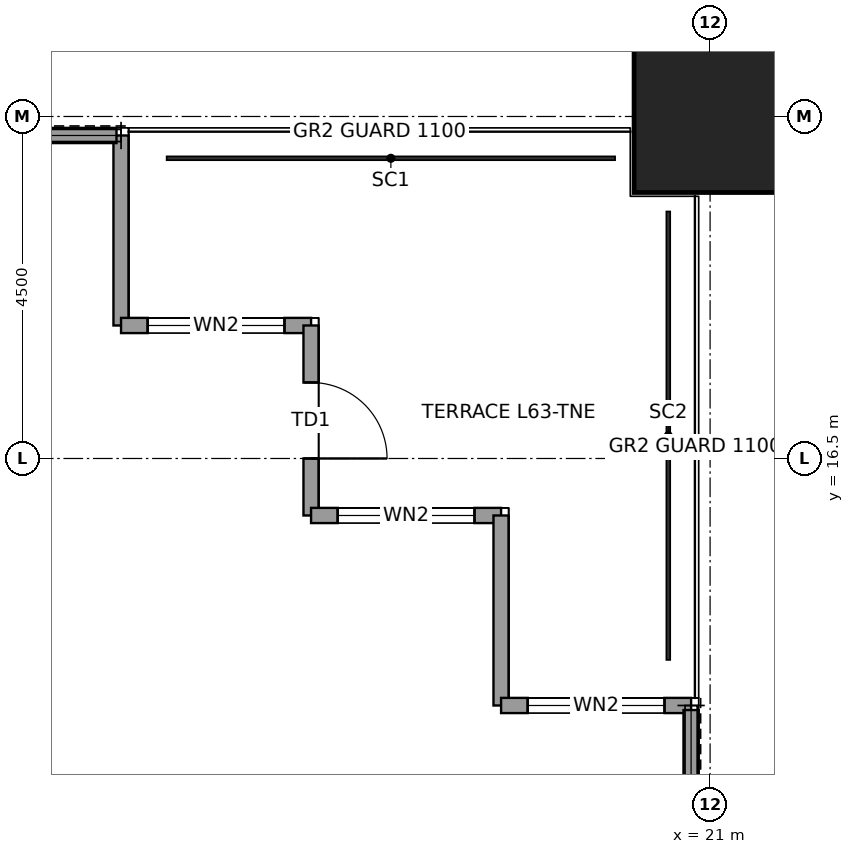
"""IFC4 building model, lengths in metres.
Left out: names, types, materials, properties, quantities, classifications, styles, units other than length and angle.
Written with IfcOpenShell. Run it as: python <this file> out.ifc"""

import sys

from ifc_helpers import new_model, si_unit, direction, frame, frame_2d, origin, origin_2d, place, context, subcontext, project, spatial, rectangle, hollow_rectangle, extrude, element, fill, save


model = new_model("IFC4")
c1 = context("Model", 3, precision=1e-05, world=origin(), true_north=direction((0.0, 1.0)))
c2 = subcontext(c1, "Body", "Model", "MODEL_VIEW")
j1 = project(units=[si_unit("LENGTHUNIT", "METRE"), si_unit("PLANEANGLEUNIT", "RADIAN")], contexts=[c1])
p1 = place(None, origin())
s1 = spatial("IfcSite", under=j1, at=p1, CompositionType="ELEMENT")
p2 = place(p1, origin())
s2 = spatial("IfcBuilding", under=s1, at=p2, CompositionType="ELEMENT")
p3 = place(p2, frame((0.0, 0.0, 287.9)))
s3 = spatial("IfcBuildingStorey", under=s2, at=p3, CompositionType="ELEMENT", Elevation=287.9)
p4 = place(p3, frame((21.0, 21.0, 0.0), z_axis=(0.0, 0.0, 1.0), x_axis=(1.0, 0.0, 0.0)))
e1 = element("IfcColumn", 1, at=p4, inside=s3, PredefinedType="COLUMN", context=c2, shape_type="SweptSolid", body=[
    extrude(hollow_rectangle(XDim=2.0, YDim=2.0, WallThickness=0.095, at=origin_2d()), origin(), (0.0, 0.0, 1.0), 4.0),
])
p5 = place(p3, frame((13.25, 20.75, 0.0), z_axis=(0.0, 0.0, 1.0), x_axis=(0.0, -1.0, 0.0)))
e2 = element("IfcWall", 2, at=p5, inside=s3, PredefinedType="SOLIDWALL", context=c2, shape_type="SweptSolid", body=[
    extrude(rectangle(XDim=2.5, YDim=0.2, at=frame_2d((1.25, 0.0))), origin(), (0.0, 0.0, 1.0), 3.85),
])
p6 = place(p3, frame((13.25, 18.25, 0.0), z_axis=(0.0, 0.0, 1.0), x_axis=(1.0, 0.0, 0.0)))
e3 = element("IfcWall", 3, at=p6, inside=s3, PredefinedType="SOLIDWALL", context=c2, shape_type="SweptSolid", body=[
    extrude(rectangle(XDim=2.5, YDim=0.2, at=frame_2d((1.25, 0.0))), origin(), (0.0, 0.0, 1.0), 3.85),
])
p7 = place(p6, frame((0.35, 0.0, 0.3)))
e4 = element("IfcOpeningElement", 4, at=p7, cuts=e3, PredefinedType="OPENING", context=c2, shape_type="SweptSolid", body=[
    extrude(rectangle(XDim=1.8, YDim=2.4, at=frame_2d((0.9, 1.2))), frame((0.0, 0.11, 0.0), z_axis=(0.0, -1.0, 0.0), x_axis=(1.0, 0.0, 0.0)), (0.0, 0.0, 1.0), 0.22),
])
p8 = place(p3, frame((15.75, 18.25, 0.0), z_axis=(0.0, 0.0, 1.0), x_axis=(0.0, -1.0, 0.0)))
e5 = element("IfcWall", 5, at=p8, inside=s3, PredefinedType="SOLIDWALL", context=c2, shape_type="SweptSolid", body=[
    extrude(rectangle(XDim=2.5, YDim=0.2, at=frame_2d((1.25, 0.0))), origin(), (0.0, 0.0, 1.0), 3.317),
])
p9 = place(p8, frame((0.75, 0.0, 0.0)))
e6 = element("IfcOpeningElement", 6, at=p9, cuts=e5, PredefinedType="OPENING", context=c2, shape_type="SweptSolid", body=[
    extrude(rectangle(XDim=1.0, YDim=2.4, at=frame_2d((0.5, 1.2))), frame((0.0, 0.11, 0.0), z_axis=(0.0, -1.0, 0.0), x_axis=(1.0, 0.0, 0.0)), (0.0, 0.0, 1.0), 0.22),
])
p10 = place(p3, frame((15.75, 15.75, 0.0), z_axis=(0.0, 0.0, 1.0), x_axis=(1.0, 0.0, 0.0)))
e7 = element("IfcWall", 7, at=p10, inside=s3, PredefinedType="SOLIDWALL", context=c2, shape_type="SweptSolid", body=[
    extrude(rectangle(XDim=2.5, YDim=0.2, at=frame_2d((1.25, 0.0))), origin(), (0.0, 0.0, 1.0), 3.85),
])
p11 = place(p10, frame((0.35, 0.0, 0.3)))
e8 = element("IfcOpeningElement", 8, at=p11, cuts=e7, PredefinedType="OPENING", context=c2, shape_type="SweptSolid", body=[
    extrude(rectangle(XDim=1.8, YDim=2.4, at=frame_2d((0.9, 1.2))), frame((0.0, 0.11, 0.0), z_axis=(0.0, -1.0, 0.0), x_axis=(1.0, 0.0, 0.0)), (0.0, 0.0, 1.0), 0.22),
])
p12 = place(p3, frame((18.25, 15.75, 0.0), z_axis=(0.0, 0.0, 1.0), x_axis=(0.0, -1.0, 0.0)))
e9 = element("IfcWall", 9, at=p12, inside=s3, PredefinedType="SOLIDWALL", context=c2, shape_type="SweptSolid", body=[
    extrude(rectangle(XDim=2.5, YDim=0.2, at=frame_2d((1.25, 0.0))), origin(), (0.0, 0.0, 1.0), 3.85),
])
p13 = place(p3, frame((18.25, 13.25, 0.0), z_axis=(0.0, 0.0, 1.0), x_axis=(1.0, 0.0, 0.0)))
e10 = element("IfcWall", 10, at=p13, inside=s3, PredefinedType="SOLIDWALL", context=c2, shape_type="SweptSolid", body=[
    extrude(rectangle(XDim=2.5, YDim=0.2, at=frame_2d((1.25, 0.0))), origin(), (0.0, 0.0, 1.0), 3.85),
])
p14 = place(p13, frame((0.35, 0.0, 0.3)))
e11 = element("IfcOpeningElement", 11, at=p14, cuts=e10, PredefinedType="OPENING", context=c2, shape_type="SweptSolid", body=[
    extrude(rectangle(XDim=1.8, YDim=2.4, at=frame_2d((0.9, 1.2))), frame((0.0, 0.11, 0.0), z_axis=(0.0, -1.0, 0.0), x_axis=(1.0, 0.0, 0.0)), (0.0, 0.0, 1.0), 0.22),
])
for number, where, z_axis, x_axis in (
    (12, (10.405, 20.75, 0.0), (0.0, 0.0, 1.0), (1.0, 0.0, 0.0)),
    (13, (20.75, 13.19, 0.0), (0.0, 0.0, 1.0), (0.0, -1.0, 0.0)),
):
    element("IfcWall", number, at=place(p3, frame(where, z_axis=z_axis, x_axis=x_axis)), inside=s3, PredefinedType="SOLIDWALL", context=c2, shape_type="SweptSolid", body=[
        extrude(rectangle(XDim=2.785, YDim=0.2, at=frame_2d((1.393, 0.0))), origin(), (0.0, 0.0, 1.0), 3.85),
    ])
p15 = place(p7, origin())
e14 = element("IfcWindow", 14, at=p15, inside=s3, PartitioningType="SINGLE_PANEL", PredefinedType="WINDOW", context=c2, shape_type="SweptSolid", body=[
    extrude(rectangle(XDim=1.8, YDim=2.4, at=frame_2d((0.9, 1.2))), frame((0.0, 0.03, 0.0), z_axis=(0.0, -1.0, 0.0), x_axis=(1.0, 0.0, 0.0)), (0.0, 0.0, 1.0), 0.06),
])
fill(e4, e14)
p16 = place(p9, origin())
e15 = element("IfcDoor", 15, at=p16, inside=s3, OperationType="SINGLE_SWING_RIGHT", PredefinedType="DOOR", context=c2, shape_type="SweptSolid", body=[
    extrude(rectangle(XDim=1.0, YDim=2.4, at=frame_2d((0.5, 1.2))), frame((0.0, 0.025, 0.0), z_axis=(0.0, -1.0, 0.0), x_axis=(1.0, 0.0, 0.0)), (0.0, 0.0, 1.0), 0.05),
])
fill(e6, e15)
p17 = place(p11, origin())
e16 = element("IfcWindow", 16, at=p17, inside=s3, PartitioningType="SINGLE_PANEL", PredefinedType="WINDOW", context=c2, shape_type="SweptSolid", body=[
    extrude(rectangle(XDim=1.8, YDim=2.4, at=frame_2d((0.9, 1.2))), frame((0.0, 0.03, 0.0), z_axis=(0.0, -1.0, 0.0), x_axis=(1.0, 0.0, 0.0)), (0.0, 0.0, 1.0), 0.06),
])
fill(e8, e16)
p18 = place(p14, origin())
e17 = element("IfcWindow", 17, at=p18, inside=s3, PartitioningType="SINGLE_PANEL", PredefinedType="WINDOW", context=c2, shape_type="SweptSolid", body=[
    extrude(rectangle(XDim=1.8, YDim=2.4, at=frame_2d((0.9, 1.2))), frame((0.0, 0.03, 0.0), z_axis=(0.0, -1.0, 0.0), x_axis=(1.0, 0.0, 0.0)), (0.0, 0.0, 1.0), 0.06),
])
fill(e11, e17)
save(model, sys.argv[1])
